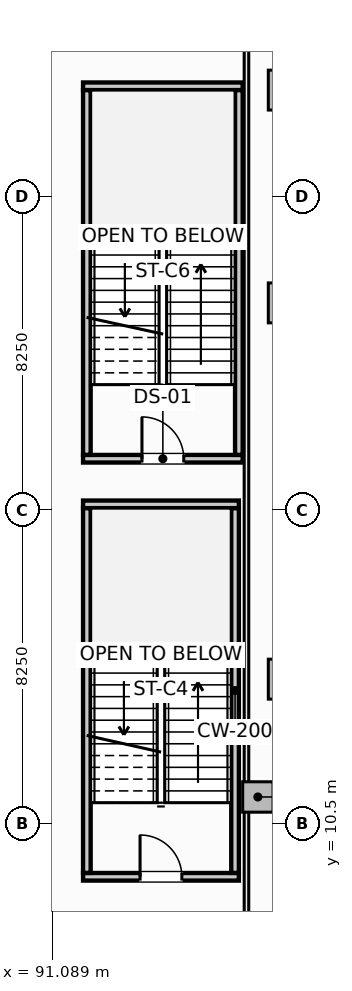
"""IFC4 building model, lengths in metres.
Left out: names, types, materials, properties, quantities, classifications, styles, units other than length and angle.
Written with IfcOpenShell. Run it as: python <this file> out.ifc"""

import sys

from ifc_helpers import new_model, si_unit, direction, frame, frame_2d, origin, origin_2d, place, context, subcontext, project, spatial, rectangle, extrude, element, fill, save


model = new_model("IFC4")
c1 = context("Model", 3, precision=1e-05, world=origin(), true_north=direction((0.0, 1.0)))
c2 = subcontext(c1, "Body", "Model", "MODEL_VIEW")
j1 = project(units=[si_unit("LENGTHUNIT", "METRE"), si_unit("PLANEANGLEUNIT", "RADIAN")], contexts=[c1])
p1 = place(None, origin())
s1 = spatial("IfcSite", under=j1, at=p1, CompositionType="ELEMENT")
p2 = place(p1, origin())
s2 = spatial("IfcBuilding", under=s1, at=p2, CompositionType="ELEMENT")
p3 = place(p2, frame((0.0, 0.0, -4.5)))
s3 = spatial("IfcBuildingStorey", under=s2, at=p3, CompositionType="ELEMENT", Elevation=-4.5)
for number, where, z_axis, x_axis in (
    (1, (97.3, 14.3, -0.32), (0.0, 0.0, 1.0), (1.0, 0.0, 0.0)),
    (2, (97.3, 24.2, -0.32), (0.0, 0.0, 1.0), (1.0, 0.0, 0.0)),
    (3, (97.3, 29.8, -0.32), (0.0, 0.0, 1.0), (1.0, 0.0, 0.0)),
):
    element("IfcColumn", number, at=place(p3, frame(where, z_axis=z_axis, x_axis=x_axis)), inside=s3, PredefinedType="COLUMN", context=c2, shape_type="SweptSolid", body=[
        extrude(rectangle(XDim=1.05, YDim=1.05, at=origin_2d()), origin(), (0.0, 0.0, 1.0), 4.46),
    ])
p4 = place(p3, frame((96.5, 11.2, -0.32), z_axis=(0.0, 0.0, 1.0), x_axis=(1.0, 0.0, 0.0)))
e4 = element("IfcColumn", 4, at=p4, inside=s3, PredefinedType="PILASTER", context=c2, shape_type="SweptSolid", body=[
    extrude(rectangle(XDim=0.8, YDim=0.8, at=origin_2d()), origin(), (0.0, 0.0, 1.0), 4.46),
])
p5 = place(p3, frame((91.9, 9.1, -0.32), z_axis=(0.0, 0.0, 1.0), x_axis=(1.0, 0.0, 0.0)))
e5 = element("IfcWall", 5, at=p5, inside=s3, PredefinedType="SHEAR", context=c2, shape_type="SweptSolid", body=[
    extrude(rectangle(XDim=4.1, YDim=0.2, at=frame_2d((2.05, 0.0))), origin(), (0.0, 0.0, 1.0), 4.46),
])
p6 = place(p5, frame((1.5, 0.0, 0.32)))
e6 = element("IfcOpeningElement", 6, at=p6, cuts=e5, PredefinedType="OPENING", context=c2, shape_type="SweptSolid", body=[
    extrude(rectangle(XDim=1.1, YDim=2.15, at=frame_2d((0.55, 1.075))), frame((0.0, 0.11, 0.0), z_axis=(0.0, -1.0, 0.0), x_axis=(1.0, 0.0, 0.0)), (0.0, 0.0, 1.0), 0.22),
])
p7 = place(p3, frame((91.9, 18.9, -0.32), z_axis=(0.0, 0.0, 1.0), x_axis=(1.0, 0.0, 0.0)))
e7 = element("IfcWall", 7, at=p7, inside=s3, PredefinedType="SHEAR", context=c2, shape_type="SweptSolid", body=[
    extrude(rectangle(XDim=4.1, YDim=0.2, at=frame_2d((2.05, 0.0))), origin(), (0.0, 0.0, 1.0), 4.46),
])
for number, where, z_axis, x_axis in (
    (8, (92.0, 9.202, -0.32), (0.0, 0.0, 1.0), (0.0, 1.0, 0.0)),
    (9, (95.9, 9.202, -0.32), (0.0, 0.0, 1.0), (0.0, 1.0, 0.0)),
):
    element("IfcWall", number, at=place(p3, frame(where, z_axis=z_axis, x_axis=x_axis)), inside=s3, PredefinedType="SHEAR", context=c2, shape_type="SweptSolid", body=[
        extrude(rectangle(XDim=9.596, YDim=0.2, at=frame_2d((4.798, 0.0))), origin(), (0.0, 0.0, 1.0), 4.46),
    ])
p8 = place(p3, frame((91.9, 20.1, -0.32), z_axis=(0.0, 0.0, 1.0), x_axis=(1.0, 0.0, 0.0)))
e10 = element("IfcWall", 10, at=p8, inside=s3, PredefinedType="SHEAR", context=c2, shape_type="SweptSolid", body=[
    extrude(rectangle(XDim=4.2, YDim=0.2, at=frame_2d((2.1, 0.0))), origin(), (0.0, 0.0, 1.0), 4.46),
])
p9 = place(p8, frame((1.55, 0.0, 0.32)))
e11 = element("IfcOpeningElement", 11, at=p9, cuts=e10, PredefinedType="OPENING", context=c2, shape_type="SweptSolid", body=[
    extrude(rectangle(XDim=1.1, YDim=2.15, at=frame_2d((0.55, 1.075))), frame((0.0, 0.11, 0.0), z_axis=(0.0, -1.0, 0.0), x_axis=(1.0, 0.0, 0.0)), (0.0, 0.0, 1.0), 0.22),
])
p10 = place(p3, frame((91.9, 29.9, -0.32), z_axis=(0.0, 0.0, 1.0), x_axis=(1.0, 0.0, 0.0)))
e12 = element("IfcWall", 12, at=p10, inside=s3, PredefinedType="SHEAR", context=c2, shape_type="SweptSolid", body=[
    extrude(rectangle(XDim=4.2, YDim=0.2, at=frame_2d((2.1, 0.0))), origin(), (0.0, 0.0, 1.0), 4.46),
])
for number, where, z_axis, x_axis in (
    (13, (92.0, 20.202, -0.32), (0.0, 0.0, 1.0), (0.0, 1.0, 0.0)),
    (14, (96.0, 20.202, -0.32), (0.0, 0.0, 1.0), (0.0, 1.0, 0.0)),
):
    element("IfcWall", number, at=place(p3, frame(where, z_axis=z_axis, x_axis=x_axis)), inside=s3, PredefinedType="SHEAR", context=c2, shape_type="SweptSolid", body=[
        extrude(rectangle(XDim=9.596, YDim=0.2, at=frame_2d((4.798, 0.0))), origin(), (0.0, 0.0, 1.0), 4.46),
    ])
p11 = place(p3, frame((96.2, 6.612, 0.0), z_axis=(0.0, 0.0, 1.0), x_axis=(0.0, 1.0, 0.0)))
e15 = element("IfcWall", 15, at=p11, inside=s3, PredefinedType="PARTITIONING", context=c2, shape_type="SweptSolid", body=[
    extrude(rectangle(XDim=39.976, YDim=0.12, at=frame_2d((19.988, 0.0))), origin(), (0.0, 0.0, 1.0), 4.14),
])
p12 = place(p6, origin())
e16 = element("IfcDoor", 16, at=p12, inside=s3, OperationType="SINGLE_SWING_LEFT", PredefinedType="DOOR", context=c2, shape_type="SweptSolid", body=[
    extrude(rectangle(XDim=1.1, YDim=2.15, at=frame_2d((0.55, 1.075))), frame((0.0, 0.025, 0.0), z_axis=(0.0, -1.0, 0.0), x_axis=(1.0, 0.0, 0.0)), (0.0, 0.0, 1.0), 0.05),
])
fill(e6, e16)
p13 = place(p9, origin())
e17 = element("IfcDoor", 17, at=p13, inside=s3, OperationType="SINGLE_SWING_LEFT", PredefinedType="DOOR", context=c2, shape_type="SweptSolid", body=[
    extrude(rectangle(XDim=1.1, YDim=2.15, at=frame_2d((0.55, 1.075))), frame((0.0, 0.025, 0.0), z_axis=(0.0, -1.0, 0.0), x_axis=(1.0, 0.0, 0.0)), (0.0, 0.0, 1.0), 0.05),
])
fill(e11, e17)
save(model, sys.argv[1])
